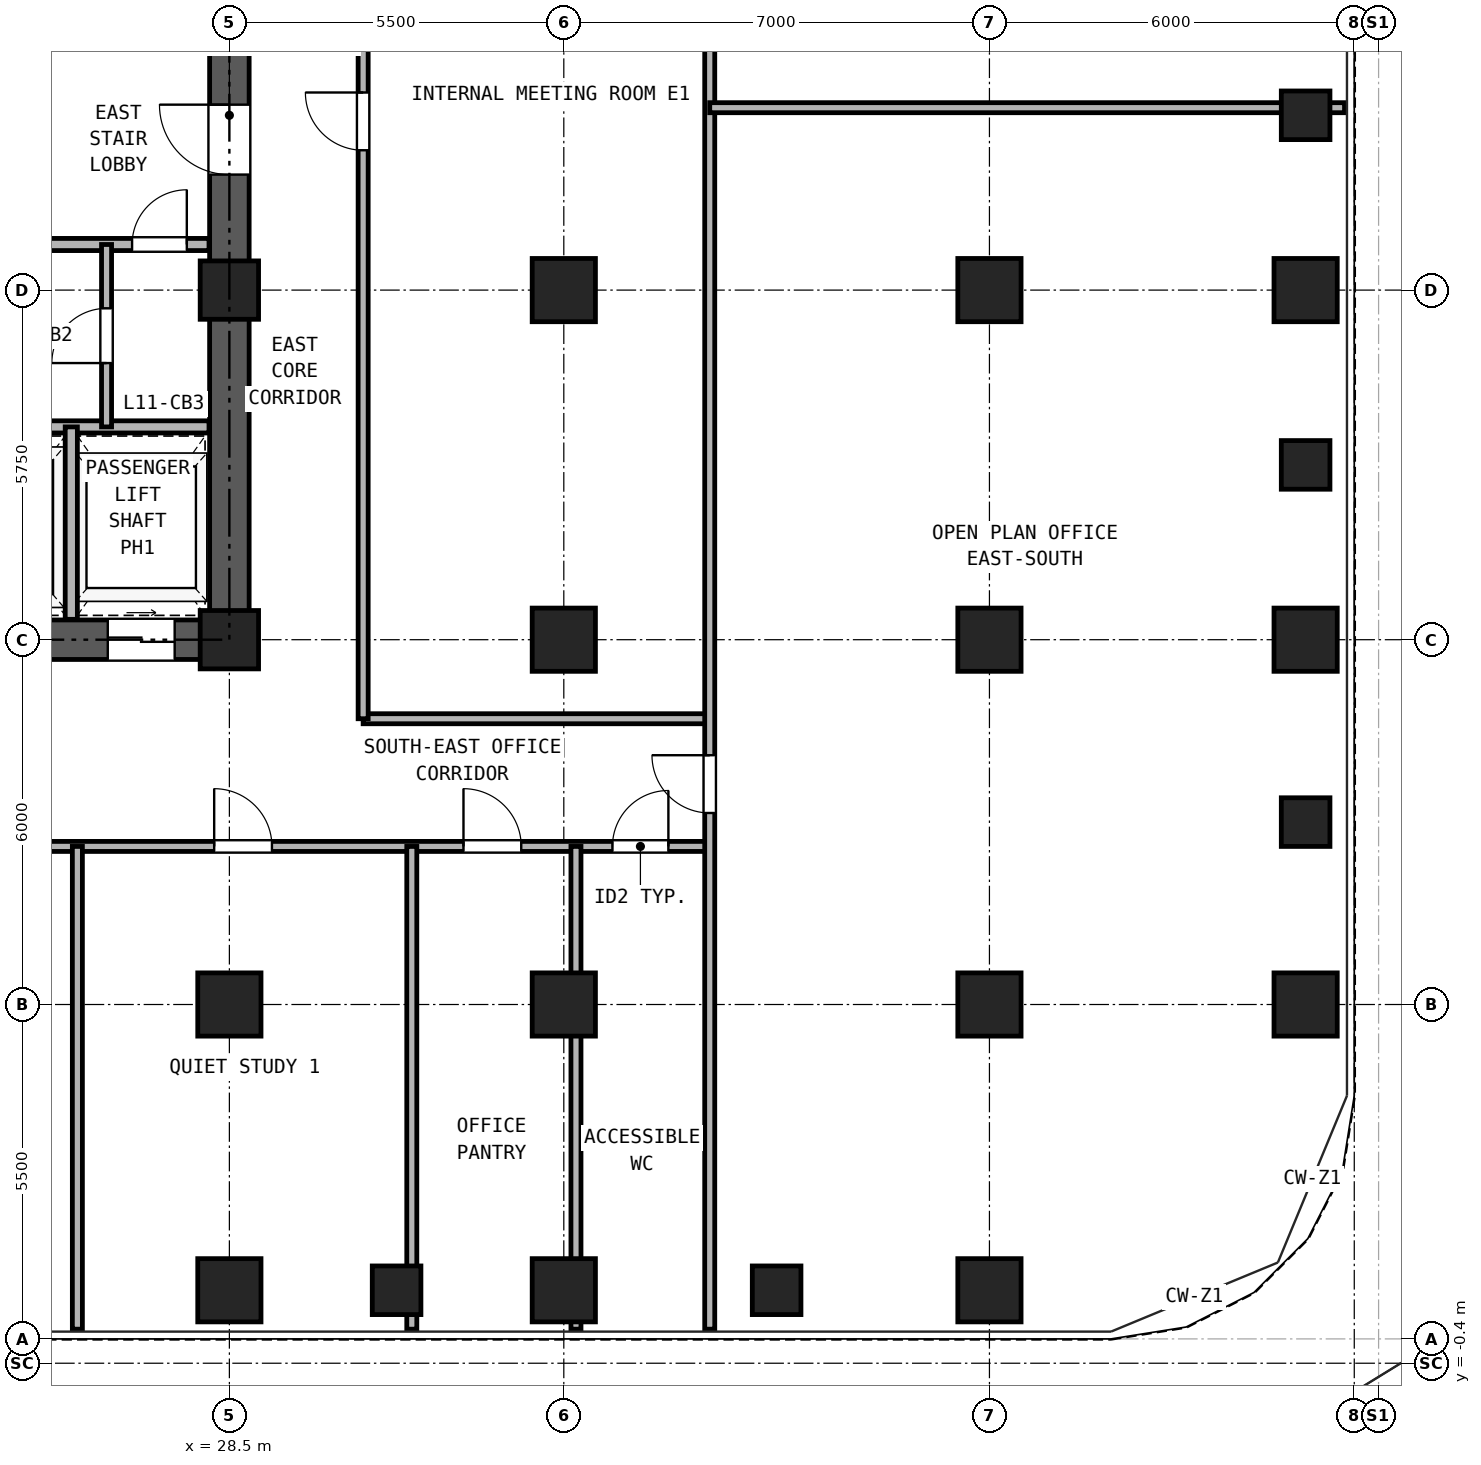
"""IFC4 building model, lengths in metres.
Left out: names, types, materials, properties, quantities, classifications, styles, units other than length and angle.
Written with IfcOpenShell. Run it as: python <this file> out.ifc"""

import sys

from ifc_helpers import new_model, si_unit, direction, frame, frame_2d, origin, origin_2d, place, context, subcontext, project, spatial, rectangle, hollow_rectangle, extrude, source, transform, mapped, element, fill, save


model = new_model("IFC4")
c1 = context("Model", 3, precision=1e-05, world=origin(), true_north=direction((0.0, 1.0)))
c2 = subcontext(c1, "Body", "Model", "MODEL_VIEW")
j1 = project(units=[si_unit("LENGTHUNIT", "METRE"), si_unit("PLANEANGLEUNIT", "RADIAN")], contexts=[c1])
p1 = place(None, origin())
s1 = spatial("IfcSite", under=j1, at=p1, CompositionType="ELEMENT")
p2 = place(p1, origin())
s2 = spatial("IfcBuilding", under=s1, at=p2, CompositionType="ELEMENT")
p3 = place(p2, frame((0.0, 0.0, 44.1)))
s3 = spatial("IfcBuildingStorey", under=s2, at=p3, CompositionType="ELEMENT", Elevation=44.1)
m1 = source(origin(), c2, "Body", "SweptSolid", [
    extrude(hollow_rectangle(XDim=1.04, YDim=1.04, WallThickness=0.065, at=origin_2d()), origin(), (0.0, 0.0, 1.0), 3.32),
])
for number, where, z_axis, x_axis in (
    (1, (28.5, 0.8, 0.0), (0.0, 0.0, 1.0), (1.0, 0.0, 0.0)),
    (2, (34.0, 0.8, 0.0), (0.0, 0.0, 1.0), (1.0, 0.0, 0.0)),
    (3, (41.0, 0.8, 0.0), (0.0, 0.0, 1.0), (1.0, 0.0, 0.0)),
    (4, (46.2, 5.5, 0.0), (0.0, 0.0, 1.0), (1.0, 0.0, 0.0)),
    (5, (46.2, 11.5, 0.0), (0.0, 0.0, 1.0), (1.0, 0.0, 0.0)),
    (6, (46.2, 17.25, 0.0), (0.0, 0.0, 1.0), (1.0, 0.0, 0.0)),
    (7, (28.5, 5.5, 0.0), (0.0, 0.0, 1.0), (1.0, 0.0, 0.0)),
):
    element("IfcColumn", number, at=place(p3, frame(where, z_axis=z_axis, x_axis=x_axis)), inside=s3, PredefinedType="COLUMN", context=c2, shape_type="MappedRepresentation", body=[
        mapped(m1, transform((0.0, 0.0, 0.0), x_axis=(1.0, 0.0, 0.0), y_axis=(0.0, 1.0, 0.0), z_axis=(0.0, 0.0, 1.0), scale=1.0)),
    ])
m2 = source(origin(), c2, "Body", "SweptSolid", [
    extrude(hollow_rectangle(XDim=0.96, YDim=0.96, WallThickness=0.06, at=origin_2d()), origin(), (0.0, 0.0, 1.0), 3.32),
])
for number, where, z_axis, x_axis in (
    (8, (28.5, 11.5, 0.0), (0.0, 0.0, 1.0), (1.0, 0.0, 0.0)),
    (9, (28.5, 17.25, 0.0), (0.0, 0.0, 1.0), (1.0, 0.0, 0.0)),
):
    element("IfcColumn", number, at=place(p3, frame(where, z_axis=z_axis, x_axis=x_axis)), inside=s3, PredefinedType="COLUMN", context=c2, shape_type="MappedRepresentation", body=[
        mapped(m2, transform((0.0, 0.0, 0.0), x_axis=(1.0, 0.0, 0.0), y_axis=(0.0, 1.0, 0.0), z_axis=(0.0, 0.0, 1.0), scale=1.0)),
    ])
for number, where, z_axis, x_axis in (
    (10, (34.0, 5.5, 0.0), (0.0, 0.0, 1.0), (1.0, 0.0, 0.0)),
    (11, (34.0, 11.5, 0.0), (0.0, 0.0, 1.0), (1.0, 0.0, 0.0)),
    (12, (34.0, 17.25, 0.0), (0.0, 0.0, 1.0), (1.0, 0.0, 0.0)),
    (13, (41.0, 5.5, 0.0), (0.0, 0.0, 1.0), (1.0, 0.0, 0.0)),
    (14, (41.0, 11.5, 0.0), (0.0, 0.0, 1.0), (1.0, 0.0, 0.0)),
    (15, (41.0, 17.25, 0.0), (0.0, 0.0, 1.0), (1.0, 0.0, 0.0)),
):
    element("IfcColumn", number, at=place(p3, frame(where, z_axis=z_axis, x_axis=x_axis)), inside=s3, PredefinedType="COLUMN", context=c2, shape_type="MappedRepresentation", body=[
        mapped(m1, transform((0.0, 0.0, 0.0), x_axis=(1.0, 0.0, 0.0), y_axis=(0.0, 1.0, 0.0), z_axis=(0.0, 0.0, 1.0), scale=1.0)),
    ])
m3 = source(origin(), c2, "Body", "SweptSolid", [
    extrude(hollow_rectangle(XDim=0.8, YDim=0.8, WallThickness=0.045, at=origin_2d()), origin(), (0.0, 0.0, 1.0), 3.32),
])
for number, where, z_axis, x_axis in (
    (16, (31.25, 0.8, 0.0), (0.0, 0.0, 1.0), (1.0, 0.0, 0.0)),
    (17, (37.5, 0.8, 0.0), (0.0, 0.0, 1.0), (1.0, 0.0, 0.0)),
    (18, (46.2, 8.5, 0.0), (0.0, 0.0, 1.0), (1.0, 0.0, 0.0)),
    (19, (46.2, 14.375, 0.0), (0.0, 0.0, 1.0), (1.0, 0.0, 0.0)),
    (20, (46.2, 20.125, 0.0), (0.0, 0.0, 1.0), (1.0, 0.0, 0.0)),
):
    element("IfcColumn", number, at=place(p3, frame(where, z_axis=z_axis, x_axis=x_axis)), inside=s3, PredefinedType="COLUMN", context=c2, shape_type="MappedRepresentation", body=[
        mapped(m3, transform((0.0, 0.0, 0.0), x_axis=(1.0, 0.0, 0.0), y_axis=(0.0, 1.0, 0.0), z_axis=(0.0, 0.0, 1.0), scale=1.0)),
    ])
p4 = place(p3, frame((18.175, 11.5, 0.0), z_axis=(0.0, 0.0, 1.0), x_axis=(1.0, 0.0, 0.0)))
e21 = element("IfcWall", 21, at=p4, inside=s3, PredefinedType="SHEAR", context=c2, shape_type="SweptSolid", body=[
    extrude(rectangle(XDim=10.65, YDim=0.65, at=frame_2d((5.325, 0.0))), origin(), (0.0, 0.0, 1.0), 3.32),
])
p5 = place(p4, frame((1.195, 0.0, 0.0)))
e22 = element("IfcOpeningElement", 22, at=p5, cuts=e21, PredefinedType="OPENING", context=c2, shape_type="SweptSolid", body=[
    extrude(rectangle(XDim=1.1, YDim=2.25, at=frame_2d((0.55, 1.125))), frame((0.0, 0.335, 0.0), z_axis=(0.0, -1.0, 0.0), x_axis=(1.0, 0.0, 0.0)), (0.0, 0.0, 1.0), 0.67),
])
p6 = place(p4, frame((3.495, 0.0, 0.0)))
e23 = element("IfcOpeningElement", 23, at=p6, cuts=e21, PredefinedType="OPENING", context=c2, shape_type="SweptSolid", body=[
    extrude(rectangle(XDim=1.1, YDim=2.25, at=frame_2d((0.55, 1.125))), frame((0.0, 0.335, 0.0), z_axis=(0.0, -1.0, 0.0), x_axis=(1.0, 0.0, 0.0)), (0.0, 0.0, 1.0), 0.67),
])
p7 = place(p4, frame((5.925, 0.0, 0.0)))
e24 = element("IfcOpeningElement", 24, at=p7, cuts=e21, PredefinedType="OPENING", context=c2, shape_type="SweptSolid", body=[
    extrude(rectangle(XDim=1.1, YDim=2.25, at=frame_2d((0.55, 1.125))), frame((0.0, 0.335, 0.0), z_axis=(0.0, -1.0, 0.0), x_axis=(1.0, 0.0, 0.0)), (0.0, 0.0, 1.0), 0.67),
])
p8 = place(p4, frame((8.325, 0.0, 0.0)))
e25 = element("IfcOpeningElement", 25, at=p8, cuts=e21, PredefinedType="OPENING", context=c2, shape_type="SweptSolid", body=[
    extrude(rectangle(XDim=1.1, YDim=2.25, at=frame_2d((0.55, 1.125))), frame((0.0, 0.335, 0.0), z_axis=(0.0, -1.0, 0.0), x_axis=(1.0, 0.0, 0.0)), (0.0, 0.0, 1.0), 0.67),
])
p9 = place(p3, frame((28.5, 11.825, 0.0), z_axis=(0.0, 0.0, 1.0), x_axis=(0.0, 1.0, 0.0)))
e26 = element("IfcWall", 26, at=p9, inside=s3, PredefinedType="SHEAR", context=c2, shape_type="SweptSolid", body=[
    extrude(rectangle(XDim=16.6, YDim=0.65, at=frame_2d((8.3, 0.0))), origin(), (0.0, 0.0, 1.0), 3.32),
])
p10 = place(p9, frame((7.325, 0.0, 0.0)))
e27 = element("IfcOpeningElement", 27, at=p10, cuts=e26, PredefinedType="OPENING", context=c2, shape_type="SweptSolid", body=[
    extrude(rectangle(XDim=1.15, YDim=2.2, at=frame_2d((0.575, 1.1))), frame((0.0, 0.335, 0.0), z_axis=(0.0, -1.0, 0.0), x_axis=(1.0, 0.0, 0.0)), (0.0, 0.0, 1.0), 0.67),
])
p11 = place(p3, frame((18.835, 18.0, 0.0), z_axis=(0.0, 0.0, 1.0), x_axis=(1.0, 0.0, 0.0)))
e28 = element("IfcWall", 28, at=p11, inside=s3, PredefinedType="PARTITIONING", context=c2, shape_type="SweptSolid", body=[
    extrude(rectangle(XDim=9.33, YDim=0.2, at=frame_2d((4.665, 0.0))), origin(), (0.0, 0.0, 1.0), 3.32),
])
p12 = place(p11, frame((0.415, 0.0, 0.0)))
e29 = element("IfcOpeningElement", 29, at=p12, cuts=e28, PredefinedType="OPENING", context=c2, shape_type="SweptSolid", body=[
    extrude(rectangle(XDim=1.3, YDim=2.3, at=frame_2d((0.65, 1.15))), frame((0.0, 0.11, 0.0), z_axis=(0.0, -1.0, 0.0), x_axis=(1.0, 0.0, 0.0)), (0.0, 0.0, 1.0), 0.22),
])
p13 = place(p11, frame((2.515, 0.0, 0.0)))
e30 = element("IfcOpeningElement", 30, at=p13, cuts=e28, PredefinedType="OPENING", context=c2, shape_type="SweptSolid", body=[
    extrude(rectangle(XDim=1.3, YDim=2.3, at=frame_2d((0.65, 1.15))), frame((0.0, 0.11, 0.0), z_axis=(0.0, -1.0, 0.0), x_axis=(1.0, 0.0, 0.0)), (0.0, 0.0, 1.0), 0.22),
])
p14 = place(p11, frame((4.935, 0.0, 0.0)))
e31 = element("IfcOpeningElement", 31, at=p14, cuts=e28, PredefinedType="OPENING", context=c2, shape_type="SweptSolid", body=[
    extrude(rectangle(XDim=0.9, YDim=2.05, at=frame_2d((0.45, 1.025))), frame((0.0, 0.11, 0.0), z_axis=(0.0, -1.0, 0.0), x_axis=(1.0, 0.0, 0.0)), (0.0, 0.0, 1.0), 0.22),
])
p15 = place(p11, frame((8.065, 0.0, 0.0)))
e32 = element("IfcOpeningElement", 32, at=p15, cuts=e28, PredefinedType="OPENING", context=c2, shape_type="SweptSolid", body=[
    extrude(rectangle(XDim=0.9, YDim=2.05, at=frame_2d((0.45, 1.025))), frame((0.0, 0.11, 0.0), z_axis=(0.0, -1.0, 0.0), x_axis=(1.0, 0.0, 0.0)), (0.0, 0.0, 1.0), 0.22),
])
p16 = place(p3, frame((18.835, 15.0, 0.0), z_axis=(0.0, 0.0, 1.0), x_axis=(1.0, 0.0, 0.0)))
e33 = element("IfcWall", 33, at=p16, inside=s3, PredefinedType="PARTITIONING", context=c2, shape_type="SweptSolid", body=[
    extrude(rectangle(XDim=9.33, YDim=0.2, at=frame_2d((4.665, 0.0))), origin(), (0.0, 0.0, 1.0), 3.32),
])
p17 = place(p3, frame((26.48, 15.0, 0.0), z_axis=(0.0, 0.0, 1.0), x_axis=(0.0, 1.0, 0.0)))
e34 = element("IfcWall", 34, at=p17, inside=s3, PredefinedType="PARTITIONING", context=c2, shape_type="SweptSolid", body=[
    extrude(rectangle(XDim=3.0, YDim=0.165, at=frame_2d((1.5, 0.0))), origin(), (0.0, 0.0, 1.0), 3.32),
])
p18 = place(p17, frame((1.05, 0.0, 0.0)))
e35 = element("IfcOpeningElement", 35, at=p18, cuts=e34, PredefinedType="OPENING", context=c2, shape_type="SweptSolid", body=[
    extrude(rectangle(XDim=0.9, YDim=2.05, at=frame_2d((0.45, 1.025))), frame((0.0, 0.093, 0.0), z_axis=(0.0, -1.0, 0.0), x_axis=(1.0, 0.0, 0.0)), (0.0, 0.0, 1.0), 0.185),
])
p19 = place(p3, frame((25.9, 11.835, 0.0), z_axis=(0.0, 0.0, 1.0), x_axis=(0.0, 1.0, 0.0)))
e36 = element("IfcWall", 36, at=p19, inside=s3, PredefinedType="PARTITIONING", context=c2, shape_type="SweptSolid", body=[
    extrude(rectangle(XDim=3.165, YDim=0.2, at=frame_2d((1.583, 0.0))), origin(), (0.0, 0.0, 1.0), 3.32),
])
p20 = place(p3, frame((10.6, 8.1, 0.0), z_axis=(0.0, 0.0, 1.0), x_axis=(1.0, 0.0, 0.0)))
e37 = element("IfcWall", 37, at=p20, inside=s3, PredefinedType="PARTITIONING", context=c2, shape_type="SweptSolid", body=[
    extrude(rectangle(XDim=25.8, YDim=0.165, at=frame_2d((12.9, 0.0))), origin(), (0.0, 0.0, 1.0), 3.32),
])
p21 = place(p20, frame((7.2, 0.0, 0.0)))
e38 = element("IfcOpeningElement", 38, at=p21, cuts=e37, PredefinedType="OPENING", context=c2, shape_type="SweptSolid", body=[
    extrude(rectangle(XDim=0.95, YDim=2.15, at=frame_2d((0.475, 1.075))), frame((0.0, 0.093, 0.0), z_axis=(0.0, -1.0, 0.0), x_axis=(1.0, 0.0, 0.0)), (0.0, 0.0, 1.0), 0.185),
])
p22 = place(p20, frame((17.65, 0.0, 0.0)))
e39 = element("IfcOpeningElement", 39, at=p22, cuts=e37, PredefinedType="OPENING", context=c2, shape_type="SweptSolid", body=[
    extrude(rectangle(XDim=0.95, YDim=2.15, at=frame_2d((0.475, 1.075))), frame((0.0, 0.093, 0.0), z_axis=(0.0, -1.0, 0.0), x_axis=(1.0, 0.0, 0.0)), (0.0, 0.0, 1.0), 0.185),
])
p23 = place(p20, frame((21.75, 0.0, 0.0)))
e40 = element("IfcOpeningElement", 40, at=p23, cuts=e37, PredefinedType="OPENING", context=c2, shape_type="SweptSolid", body=[
    extrude(rectangle(XDim=0.95, YDim=2.15, at=frame_2d((0.475, 1.075))), frame((0.0, 0.093, 0.0), z_axis=(0.0, -1.0, 0.0), x_axis=(1.0, 0.0, 0.0)), (0.0, 0.0, 1.0), 0.185),
])
p24 = place(p20, frame((24.2, 0.0, 0.0)))
e41 = element("IfcOpeningElement", 41, at=p24, cuts=e37, PredefinedType="OPENING", context=c2, shape_type="SweptSolid", body=[
    extrude(rectangle(XDim=0.92, YDim=2.1, at=frame_2d((0.46, 1.05))), frame((0.0, 0.093, 0.0), z_axis=(0.0, -1.0, 0.0), x_axis=(1.0, 0.0, 0.0)), (0.0, 0.0, 1.0), 0.185),
])
p25 = place(p3, frame((30.7, 10.2, 0.0), z_axis=(0.0, 0.0, 1.0), x_axis=(1.0, 0.0, 0.0)))
e42 = element("IfcWall", 42, at=p25, inside=s3, PredefinedType="PARTITIONING", context=c2, shape_type="SweptSolid", body=[
    extrude(rectangle(XDim=5.7, YDim=0.165, at=frame_2d((2.85, 0.0))), origin(), (0.0, 0.0, 1.0), 3.32),
])
p26 = place(p3, frame((30.7, 10.2, 0.0), z_axis=(0.0, 0.0, 1.0), x_axis=(0.0, 1.0, 0.0)))
e43 = element("IfcWall", 43, at=p26, inside=s3, PredefinedType="PARTITIONING", context=c2, shape_type="SweptSolid", body=[
    extrude(rectangle(XDim=19.7, YDim=0.165, at=frame_2d((9.85, 0.0))), origin(), (0.0, 0.0, 1.0), 3.32),
])
p27 = place(p26, frame((9.35, 0.0, 0.0)))
e44 = element("IfcOpeningElement", 44, at=p27, cuts=e43, PredefinedType="OPENING", context=c2, shape_type="SweptSolid", body=[
    extrude(rectangle(XDim=0.95, YDim=2.15, at=frame_2d((0.475, 1.075))), frame((0.0, 0.093, 0.0), z_axis=(0.0, -1.0, 0.0), x_axis=(1.0, 0.0, 0.0)), (0.0, 0.0, 1.0), 0.185),
])
p28 = place(p3, frame((36.4, 0.16, 0.0), z_axis=(0.0, 0.0, 1.0), x_axis=(0.0, 1.0, 0.0)))
e45 = element("IfcWall", 45, at=p28, inside=s3, PredefinedType="PARTITIONING", context=c2, shape_type="SweptSolid", body=[
    extrude(rectangle(XDim=40.18, YDim=0.165, at=frame_2d((20.09, 0.0))), origin(), (0.0, 0.0, 1.0), 3.32),
])
p29 = place(p28, frame((8.49, 0.0, 0.0)))
e46 = element("IfcOpeningElement", 46, at=p29, cuts=e45, PredefinedType="OPENING", context=c2, shape_type="SweptSolid", body=[
    extrude(rectangle(XDim=0.95, YDim=2.15, at=frame_2d((0.475, 1.075))), frame((0.0, 0.093, 0.0), z_axis=(0.0, -1.0, 0.0), x_axis=(1.0, 0.0, 0.0)), (0.0, 0.0, 1.0), 0.185),
])
p30 = place(p28, frame((30.29, 0.0, 0.0)))
e47 = element("IfcOpeningElement", 47, at=p30, cuts=e45, PredefinedType="OPENING", context=c2, shape_type="SweptSolid", body=[
    extrude(rectangle(XDim=0.95, YDim=2.15, at=frame_2d((0.475, 1.075))), frame((0.0, 0.093, 0.0), z_axis=(0.0, -1.0, 0.0), x_axis=(1.0, 0.0, 0.0)), (0.0, 0.0, 1.0), 0.185),
])
for number, where, z_axis, x_axis in (
    (48, (26.0, 0.16, 0.0), (0.0, 0.0, 1.0), (0.0, 1.0, 0.0)),
    (49, (31.5, 0.16, 0.0), (0.0, 0.0, 1.0), (0.0, 1.0, 0.0)),
):
    element("IfcWall", number, at=place(p3, frame(where, z_axis=z_axis, x_axis=x_axis)), inside=s3, PredefinedType="PARTITIONING", context=c2, shape_type="SweptSolid", body=[
        extrude(rectangle(XDim=7.94, YDim=0.165, at=frame_2d((3.97, 0.0))), origin(), (0.0, 0.0, 1.0), 3.32),
    ])
p31 = place(p3, frame((34.2, 0.16, 0.0), z_axis=(0.0, 0.0, 1.0), x_axis=(0.0, 1.0, 0.0)))
e50 = element("IfcWall", 50, at=p31, inside=s3, PredefinedType="PARTITIONING", context=c2, shape_type="SweptSolid", body=[
    extrude(rectangle(XDim=7.94, YDim=0.165, at=frame_2d((3.97, 0.0))), origin(), (0.0, 0.0, 1.0), 2.539),
])
p32 = place(p3, frame((36.4, 20.25, 0.0), z_axis=(0.0, 0.0, 1.0), x_axis=(1.0, 0.0, 0.0)))
e51 = element("IfcWall", 51, at=p32, inside=s3, PredefinedType="PARTITIONING", context=c2, shape_type="SweptSolid", body=[
    extrude(rectangle(XDim=10.44, YDim=0.165, at=frame_2d((5.22, 0.0))), origin(), (0.0, 0.0, 1.0), 2.898),
])
p33 = place(p18, origin())
e52 = element("IfcDoor", 52, at=p33, inside=s3, OperationType="SINGLE_SWING_LEFT", PredefinedType="DOOR", context=c2, shape_type="SweptSolid", body=[
    extrude(rectangle(XDim=0.9, YDim=2.05, at=frame_2d((0.45, 1.025))), frame((0.0, 0.025, 0.0), z_axis=(0.0, -1.0, 0.0), x_axis=(1.0, 0.0, 0.0)), (0.0, 0.0, 1.0), 0.05),
])
fill(e35, e52)
p34 = place(p15, frame((0.9, 0.0, 0.0), z_axis=(0.0, 0.0, 1.0), x_axis=(-1.0, 0.0, 0.0)))
e53 = element("IfcDoor", 53, at=p34, inside=s3, OperationType="SINGLE_SWING_RIGHT", PredefinedType="DOOR", context=c2, shape_type="SweptSolid", body=[
    extrude(rectangle(XDim=0.9, YDim=2.05, at=frame_2d((0.45, 1.025))), frame((0.0, 0.025, 0.0), z_axis=(0.0, -1.0, 0.0), x_axis=(1.0, 0.0, 0.0)), (0.0, 0.0, 1.0), 0.05),
])
fill(e32, e53)
p35 = place(p10, origin())
e54 = element("IfcDoor", 54, at=p35, inside=s3, OperationType="SINGLE_SWING_RIGHT", PredefinedType="DOOR", context=c2, shape_type="SweptSolid", body=[
    extrude(rectangle(XDim=1.15, YDim=2.2, at=frame_2d((0.575, 1.1))), frame((0.0, 0.025, 0.0), z_axis=(0.0, -1.0, 0.0), x_axis=(1.0, 0.0, 0.0)), (0.0, 0.0, 1.0), 0.05),
])
fill(e27, e54)
p36 = place(p8, frame((1.1, 0.0, 0.0), z_axis=(0.0, 0.0, 1.0), x_axis=(-1.0, 0.0, 0.0)))
e55 = element("IfcDoor", 55, at=p36, inside=s3, OperationType="DOUBLE_DOOR_SLIDING", PredefinedType="DOOR", context=c2, shape_type="SweptSolid", body=[
    extrude(rectangle(XDim=1.1, YDim=2.25, at=frame_2d((0.55, 1.125))), frame((0.0, 0.025, 0.0), z_axis=(0.0, -1.0, 0.0), x_axis=(1.0, 0.0, 0.0)), (0.0, 0.0, 1.0), 0.05),
])
fill(e25, e55)
p37 = place(p22, frame((0.95, 0.0, 0.0), z_axis=(0.0, 0.0, 1.0), x_axis=(-1.0, 0.0, 0.0)))
e56 = element("IfcDoor", 56, at=p37, inside=s3, OperationType="SINGLE_SWING_LEFT", PredefinedType="DOOR", context=c2, shape_type="SweptSolid", body=[
    extrude(rectangle(XDim=0.95, YDim=2.15, at=frame_2d((0.475, 1.075))), frame((0.0, 0.025, 0.0), z_axis=(0.0, -1.0, 0.0), x_axis=(1.0, 0.0, 0.0)), (0.0, 0.0, 1.0), 0.05),
])
fill(e39, e56)
p38 = place(p23, frame((0.95, 0.0, 0.0), z_axis=(0.0, 0.0, 1.0), x_axis=(-1.0, 0.0, 0.0)))
e57 = element("IfcDoor", 57, at=p38, inside=s3, OperationType="SINGLE_SWING_LEFT", PredefinedType="DOOR", context=c2, shape_type="SweptSolid", body=[
    extrude(rectangle(XDim=0.95, YDim=2.15, at=frame_2d((0.475, 1.075))), frame((0.0, 0.025, 0.0), z_axis=(0.0, -1.0, 0.0), x_axis=(1.0, 0.0, 0.0)), (0.0, 0.0, 1.0), 0.05),
])
fill(e40, e57)
p39 = place(p24, frame((0.92, 0.0, 0.0), z_axis=(0.0, 0.0, 1.0), x_axis=(-1.0, 0.0, 0.0)))
e58 = element("IfcDoor", 58, at=p39, inside=s3, OperationType="SINGLE_SWING_RIGHT", PredefinedType="DOOR", context=c2, shape_type="SweptSolid", body=[
    extrude(rectangle(XDim=0.92, YDim=2.1, at=frame_2d((0.46, 1.05))), frame((0.0, 0.025, 0.0), z_axis=(0.0, -1.0, 0.0), x_axis=(1.0, 0.0, 0.0)), (0.0, 0.0, 1.0), 0.05),
])
fill(e41, e58)
p40 = place(p29, origin())
e59 = element("IfcDoor", 59, at=p40, inside=s3, OperationType="SINGLE_SWING_RIGHT", PredefinedType="DOOR", context=c2, shape_type="SweptSolid", body=[
    extrude(rectangle(XDim=0.95, YDim=2.15, at=frame_2d((0.475, 1.075))), frame((0.0, 0.025, 0.0), z_axis=(0.0, -1.0, 0.0), x_axis=(1.0, 0.0, 0.0)), (0.0, 0.0, 1.0), 0.05),
])
fill(e46, e59)
p41 = place(p27, origin())
e60 = element("IfcDoor", 60, at=p41, inside=s3, OperationType="SINGLE_SWING_RIGHT", PredefinedType="DOOR", context=c2, shape_type="SweptSolid", body=[
    extrude(rectangle(XDim=0.95, YDim=2.15, at=frame_2d((0.475, 1.075))), frame((0.0, 0.025, 0.0), z_axis=(0.0, -1.0, 0.0), x_axis=(1.0, 0.0, 0.0)), (0.0, 0.0, 1.0), 0.05),
])
fill(e44, e60)
save(model, sys.argv[1])
